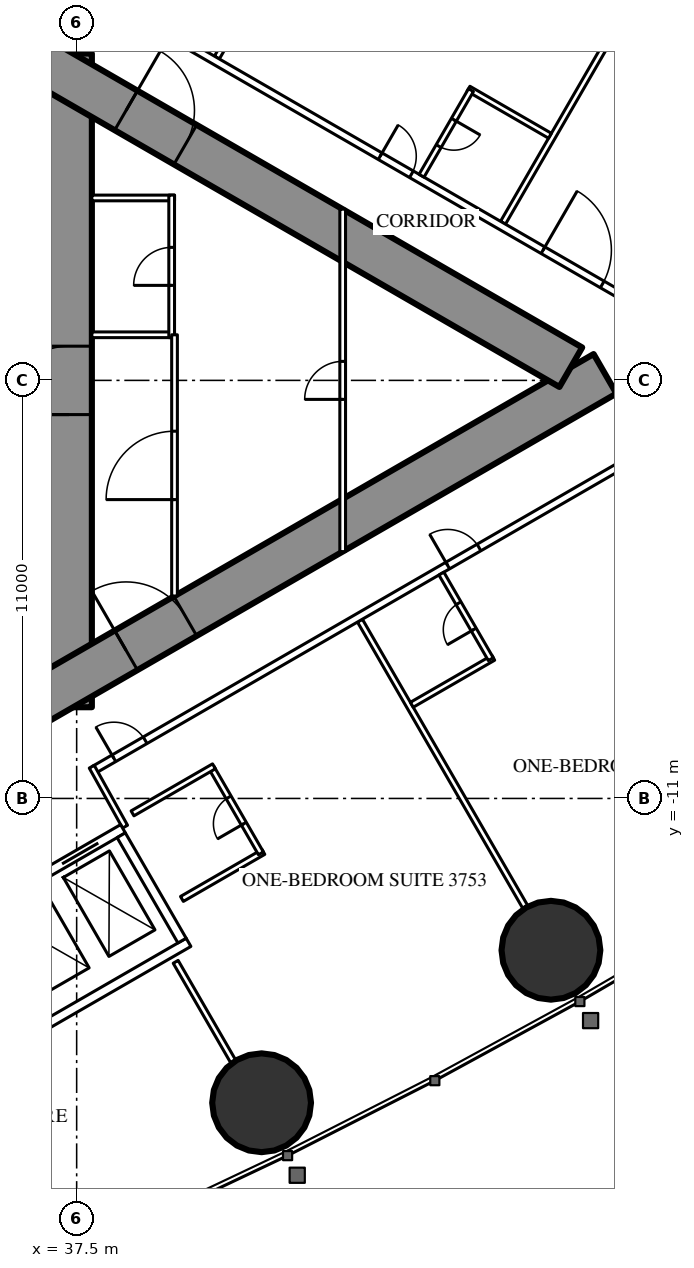
"""IFC4 building model, lengths in metres.
Left out: names, types, materials, properties, quantities, classifications, styles, units other than length and angle.
Written with IfcOpenShell. Run it as: python <this file> out.ifc"""

import sys

from ifc_helpers import new_model, si_unit, direction, frame, frame_2d, origin, origin_2d, place, context, subcontext, project, spatial, rectangle, hollow_circle, extrude, element, fill, save


model = new_model("IFC4")
c1 = context("Model", 3, precision=1e-05, world=origin(), true_north=direction((0.0, 1.0)))
c2 = subcontext(c1, "Body", "Model", "MODEL_VIEW")
j1 = project(units=[si_unit("LENGTHUNIT", "METRE"), si_unit("PLANEANGLEUNIT", "RADIAN")], contexts=[c1])
p1 = place(None, origin())
s1 = spatial("IfcSite", under=j1, at=p1, CompositionType="ELEMENT")
p2 = place(p1, origin())
s2 = spatial("IfcBuilding", under=s1, at=p2, CompositionType="ELEMENT")
p3 = place(p2, frame((0.0, 0.0, 139.6)))
s3 = spatial("IfcBuildingStorey", under=s2, at=p3, CompositionType="ELEMENT", Elevation=139.6)
for number, where, z_axis, x_axis in (
    (1, (42.366, -19.007, 0.0), (0.0, 0.0, 1.0), (1.0, 0.0, 0.0)),
    (2, (49.979, -14.994, 0.0), (0.0, 0.0, 1.0), (1.0, 0.0, 0.0)),
):
    element("IfcColumn", number, at=place(p3, frame(where, z_axis=z_axis, x_axis=x_axis)), inside=s3, PredefinedType="COLUMN", context=c2, shape_type="SweptSolid", body=[
        extrude(hollow_circle(Radius=1.3, WallThickness=0.1, at=origin_2d()), origin(), (0.0, 0.0, 1.0), 3.5),
    ])
p4 = place(p3, frame((37.3, -8.6, 0.0), z_axis=(0.0, 0.0, 1.0), x_axis=(0.0, 1.0, 0.0)))
e3 = element("IfcWall", 3, at=p4, inside=s3, PredefinedType="SHEAR", context=c2, shape_type="SweptSolid", body=[
    extrude(rectangle(XDim=17.2, YDim=1.2, at=frame_2d((8.6, 0.0))), origin(), (0.0, 0.0, 1.0), 3.5),
])
p5 = place(p4, frame((7.7, 0.0, 0.0)))
e4 = element("IfcOpeningElement", 4, at=p5, cuts=e3, PredefinedType="OPENING", context=c2, shape_type="SweptSolid", body=[
    extrude(rectangle(XDim=1.8, YDim=2.2, at=frame_2d((0.9, 1.1))), frame((0.0, 0.61, 0.0), z_axis=(0.0, -1.0, 0.0), x_axis=(1.0, 0.0, 0.0)), (0.0, 0.0, 1.0), 1.22),
])
p6 = place(p3, frame((27.2, -13.8, 0.0), z_axis=(0.0, 0.0, 1.0), x_axis=(0.866027159892, 0.499996958321, 0.0)))
e5 = element("IfcWall", 5, at=p6, inside=s3, PredefinedType="SHEAR", context=c2, shape_type="SweptSolid", body=[
    extrude(rectangle(XDim=27.947, YDim=1.2, at=frame_2d((13.973, 0.0))), origin(), (0.0, 0.0, 1.0), 3.5),
])
p7 = place(p6, frame((4.6, 0.0, 0.0)))
e6 = element("IfcOpeningElement", 6, at=p7, cuts=e5, PredefinedType="OPENING", context=c2, shape_type="SweptSolid", body=[
    extrude(rectangle(XDim=1.0, YDim=2.2, at=frame_2d((0.5, 1.1))), frame((0.0, 0.61, 0.0), z_axis=(0.0, -1.0, 0.0), x_axis=(1.0, 0.0, 0.0)), (0.0, 0.0, 1.0), 1.22),
])
p8 = place(p6, frame((13.395, 0.0, 0.0)))
e7 = element("IfcOpeningElement", 7, at=p8, cuts=e5, PredefinedType="OPENING", context=c2, shape_type="SweptSolid", body=[
    extrude(rectangle(XDim=1.8, YDim=2.2, at=frame_2d((0.9, 1.1))), frame((0.0, 0.61, 0.0), z_axis=(0.0, -1.0, 0.0), x_axis=(1.0, 0.0, 0.0)), (0.0, 0.0, 1.0), 1.22),
])
p9 = place(p3, frame((27.2, 13.8, 0.0), z_axis=(0.0, 0.0, 1.0), x_axis=(0.866024515034, -0.500001539357, 0.0)))
e8 = element("IfcWall", 8, at=p9, inside=s3, PredefinedType="SHEAR", context=c2, shape_type="SweptSolid", body=[
    extrude(rectangle(XDim=26.907, YDim=1.2, at=frame_2d((13.454, 0.0))), origin(), (0.0, 0.0, 1.0), 3.5),
])
p10 = place(p9, frame((4.6, 0.0, 0.0)))
e9 = element("IfcOpeningElement", 9, at=p10, cuts=e8, PredefinedType="OPENING", context=c2, shape_type="SweptSolid", body=[
    extrude(rectangle(XDim=1.0, YDim=2.2, at=frame_2d((0.5, 1.1))), frame((0.0, 0.61, 0.0), z_axis=(0.0, -1.0, 0.0), x_axis=(1.0, 0.0, 0.0)), (0.0, 0.0, 1.0), 1.22),
])
p11 = place(p9, frame((13.395, 0.0, 0.0)))
e10 = element("IfcOpeningElement", 10, at=p11, cuts=e8, PredefinedType="OPENING", context=c2, shape_type="SweptSolid", body=[
    extrude(rectangle(XDim=1.8, YDim=2.2, at=frame_2d((0.9, 1.1))), frame((0.0, 0.61, 0.0), z_axis=(0.0, -1.0, 0.0), x_axis=(1.0, 0.0, 0.0)), (0.0, 0.0, 1.0), 1.22),
])
p12 = place(p3, frame((44.954, -6.321, 0.0), z_axis=(0.0, 0.0, 1.0), x_axis=(0.500018676722, -0.866014620505, 0.0)))
e11 = element("IfcWall", 11, at=p12, inside=s3, PredefinedType="PARTITIONING", context=c2, shape_type="SweptSolid", body=[
    extrude(rectangle(XDim=8.704, YDim=0.15, at=frame_2d((4.352, 0.0))), origin(), (0.0, 0.0, 1.0), 2.2),
])
p13 = place(p3, frame((41.19, 8.494, 0.0), z_axis=(0.0, 0.0, 1.0), x_axis=(0.49999258054, 0.866029687369, 0.0)))
e12 = element("IfcWall", 12, at=p13, inside=s3, PredefinedType="PARTITIONING", context=c2, shape_type="SweptSolid", body=[
    extrude(rectangle(XDim=11.318, YDim=0.15, at=frame_2d((5.659, 0.0))), origin(), (0.0, 0.0, 1.0), 3.25),
])
p14 = place(p3, frame((48.719, 4.147, 0.0), z_axis=(0.0, 0.0, 1.0), x_axis=(0.499993328235, 0.866029255696, 0.0)))
e13 = element("IfcWall", 13, at=p14, inside=s3, PredefinedType="PARTITIONING", context=c2, shape_type="SweptSolid", body=[
    extrude(rectangle(XDim=8.686, YDim=0.15, at=frame_2d((4.343, 0.0))), origin(), (0.0, 0.0, 1.0), 2.2),
])
p15 = place(p3, frame((40.105, -15.299, 0.0), z_axis=(0.0, 0.0, 1.0), x_axis=(0.499978822259, -0.866037630414, 0.0)))
e14 = element("IfcWall", 14, at=p15, inside=s3, PredefinedType="PARTITIONING", context=c2, shape_type="SweptSolid", body=[
    extrude(rectangle(XDim=3.023, YDim=0.15, at=frame_2d((1.511, 0.0))), origin(), (0.0, 0.0, 1.0), 3.25),
])
p16 = place(p3, frame((37.96, -10.243, 0.0), z_axis=(0.0, 0.0, 1.0), x_axis=(0.866026429433, 0.499998223521, 0.0)))
e15 = element("IfcWall", 15, at=p16, inside=s3, PredefinedType="PARTITIONING", context=c2, shape_type="SweptSolid", body=[
    extrude(rectangle(XDim=20.487, YDim=0.2, at=frame_2d((10.243, 0.0))), origin(), (0.0, 0.0, 1.0), 3.25),
])
p17 = place(p16, frame((10.743, 0.0, 0.0)))
e16 = element("IfcOpeningElement", 16, at=p17, cuts=e15, PredefinedType="OPENING", context=c2, shape_type="SweptSolid", body=[
    extrude(rectangle(XDim=0.95, YDim=2.2, at=frame_2d((0.475, 1.1))), frame((0.0, 0.11, 0.0), z_axis=(0.0, -1.0, 0.0), x_axis=(1.0, 0.0, 0.0)), (0.0, 0.0, 1.0), 0.22),
])
p18 = place(p16, frame((17.586, 0.0, 0.0)))
e17 = element("IfcOpeningElement", 17, at=p18, cuts=e15, PredefinedType="OPENING", context=c2, shape_type="SweptSolid", body=[
    extrude(rectangle(XDim=1.8, YDim=2.2, at=frame_2d((0.9, 1.1))), frame((0.0, 0.11, 0.0), z_axis=(0.0, -1.0, 0.0), x_axis=(1.0, 0.0, 0.0)), (0.0, 0.0, 1.0), 0.22),
])
p19 = place(p16, frame((0.6, 0.0, 0.0)))
e18 = element("IfcOpeningElement", 18, at=p19, cuts=e15, PredefinedType="OPENING", context=c2, shape_type="SweptSolid", body=[
    extrude(rectangle(XDim=0.95, YDim=2.2, at=frame_2d((0.475, 1.1))), frame((0.0, 0.11, 0.0), z_axis=(0.0, -1.0, 0.0), x_axis=(1.0, 0.0, 0.0)), (0.0, 0.0, 1.0), 0.22),
])
p20 = place(p3, frame((36.834, 10.894, 0.0), z_axis=(0.0, 0.0, 1.0), x_axis=(0.866028157229, -0.499995230863, 0.0)))
e19 = element("IfcWall", 19, at=p20, inside=s3, PredefinedType="PARTITIONING", context=c2, shape_type="SweptSolid", body=[
    extrude(rectangle(XDim=21.667, YDim=0.2, at=frame_2d((10.833, 0.0))), origin(), (0.0, 0.0, 1.0), 3.25),
])
p21 = place(p20, frame((20.117, 0.0, 0.0)))
e20 = element("IfcOpeningElement", 20, at=p21, cuts=e19, PredefinedType="OPENING", context=c2, shape_type="SweptSolid", body=[
    extrude(rectangle(XDim=0.95, YDim=2.2, at=frame_2d((0.475, 1.1))), frame((0.0, 0.11, 0.0), z_axis=(0.0, -1.0, 0.0), x_axis=(1.0, 0.0, 0.0)), (0.0, 0.0, 1.0), 0.22),
])
p22 = place(p20, frame((14.938, 0.0, 0.0)))
e21 = element("IfcOpeningElement", 21, at=p22, cuts=e19, PredefinedType="OPENING", context=c2, shape_type="SweptSolid", body=[
    extrude(rectangle(XDim=1.8, YDim=2.2, at=frame_2d((0.9, 1.1))), frame((0.0, 0.11, 0.0), z_axis=(0.0, -1.0, 0.0), x_axis=(1.0, 0.0, 0.0)), (0.0, 0.0, 1.0), 0.22),
])
p23 = place(p20, frame((9.99, 0.0, 0.0)))
e22 = element("IfcOpeningElement", 22, at=p23, cuts=e19, PredefinedType="OPENING", context=c2, shape_type="SweptSolid", body=[
    extrude(rectangle(XDim=0.95, YDim=2.2, at=frame_2d((0.475, 1.1))), frame((0.0, 0.11, 0.0), z_axis=(0.0, -1.0, 0.0), x_axis=(1.0, 0.0, 0.0)), (0.0, 0.0, 1.0), 0.22),
])
p24 = place(p20, frame((3.35, 0.0, 0.0)))
e23 = element("IfcOpeningElement", 23, at=p24, cuts=e19, PredefinedType="OPENING", context=c2, shape_type="SweptSolid", body=[
    extrude(rectangle(XDim=1.0, YDim=2.2, at=frame_2d((0.5, 1.1))), frame((0.0, 0.11, 0.0), z_axis=(0.0, -1.0, 0.0), x_axis=(1.0, 0.0, 0.0)), (0.0, 0.0, 1.0), 0.22),
])
p25 = place(p3, frame((38.773, -11.742, 0.0), z_axis=(0.0, 0.0, 1.0), x_axis=(-0.485528096672, 0.8742210632, 0.0)))
e24 = element("IfcWall", 24, at=p25, inside=s3, PredefinedType="PARTITIONING", context=c2, shape_type="SweptSolid", body=[
    extrude(rectangle(XDim=1.805, YDim=0.15, at=frame_2d((0.903, 0.0))), origin(), (0.0, 0.0, 1.0), 3.25),
])
p26 = place(p3, frame((46.319, -8.535, 0.0), z_axis=(0.0, 0.0, 1.0), x_axis=(0.866006523861, 0.500032699561, 0.0)))
e25 = element("IfcWall", 25, at=p26, inside=s3, PredefinedType="PARTITIONING", context=c2, shape_type="SweptSolid", body=[
    extrude(rectangle(XDim=2.475, YDim=0.15, at=frame_2d((1.237, 0.0))), origin(), (0.0, 0.0, 1.0), 3.25),
])
p27 = place(p3, frame((47.097, -5.084, 0.0), z_axis=(0.0, 0.0, 1.0), x_axis=(0.500006934395, -0.866021400173, 0.0)))
e26 = element("IfcWall", 26, at=p27, inside=s3, PredefinedType="PARTITIONING", context=c2, shape_type="SweptSolid", body=[
    extrude(rectangle(XDim=2.6, YDim=0.15, at=frame_2d((1.3, 0.0))), origin(), (0.0, 0.0, 1.0), 3.25),
])
p28 = place(p27, frame((0.9, 0.0, 0.0)))
e27 = element("IfcOpeningElement", 27, at=p28, cuts=e26, PredefinedType="OPENING", context=c2, shape_type="SweptSolid", body=[
    extrude(rectangle(XDim=0.8, YDim=2.2, at=frame_2d((0.4, 1.1))), frame((0.0, 0.085, 0.0), z_axis=(0.0, -1.0, 0.0), x_axis=(1.0, 0.0, 0.0)), (0.0, 0.0, 1.0), 0.17),
])
p29 = place(p3, frame((47.81, 7.674, 0.0), z_axis=(0.0, 0.0, 1.0), x_axis=(0.866031185235, -0.4999899861, 0.0)))
e28 = element("IfcWall", 28, at=p29, inside=s3, PredefinedType="PARTITIONING", context=c2, shape_type="SweptSolid", body=[
    extrude(rectangle(XDim=2.475, YDim=0.15, at=frame_2d((1.238, 0.0))), origin(), (0.0, 0.0, 1.0), 3.25),
])
p30 = place(p3, frame((46.575, 5.385, 0.0), z_axis=(0.0, 0.0, 1.0), x_axis=(0.500006934395, 0.866021400173, 0.0)))
e29 = element("IfcWall", 29, at=p30, inside=s3, PredefinedType="PARTITIONING", context=c2, shape_type="SweptSolid", body=[
    extrude(rectangle(XDim=2.6, YDim=0.15, at=frame_2d((1.3, 0.0))), origin(), (0.0, 0.0, 1.0), 3.25),
])
p31 = place(p30, frame((0.9, 0.0, 0.0)))
e30 = element("IfcOpeningElement", 30, at=p31, cuts=e29, PredefinedType="OPENING", context=c2, shape_type="SweptSolid", body=[
    extrude(rectangle(XDim=0.8, YDim=2.2, at=frame_2d((0.4, 1.1))), frame((0.0, 0.085, 0.0), z_axis=(0.0, -1.0, 0.0), x_axis=(1.0, 0.0, 0.0)), (0.0, 0.0, 1.0), 0.17),
])
p32 = place(p3, frame((40.27, -13.644, 0.0), z_axis=(0.0, 0.0, 1.0), x_axis=(0.866031185235, 0.4999899861, 0.0)))
e31 = element("IfcWall", 31, at=p32, inside=s3, PredefinedType="PARTITIONING", context=c2, shape_type="SweptSolid", body=[
    extrude(rectangle(XDim=2.475, YDim=0.15, at=frame_2d((1.238, 0.0))), origin(), (0.0, 0.0, 1.0), 3.25),
])
p33 = place(p3, frame((41.048, -10.193, 0.0), z_axis=(0.0, 0.0, 1.0), x_axis=(0.500047596559, -0.865997922154, 0.0)))
e32 = element("IfcWall", 32, at=p33, inside=s3, PredefinedType="PARTITIONING", context=c2, shape_type="SweptSolid", body=[
    extrude(rectangle(XDim=2.6, YDim=0.15, at=frame_2d((1.3, 0.0))), origin(), (0.0, 0.0, 1.0), 3.25),
])
p34 = place(p33, frame((0.9, 0.0, 0.0)))
e33 = element("IfcOpeningElement", 33, at=p34, cuts=e32, PredefinedType="OPENING", context=c2, shape_type="SweptSolid", body=[
    extrude(rectangle(XDim=0.8, YDim=2.2, at=frame_2d((0.4, 1.1))), frame((0.0, 0.085, 0.0), z_axis=(0.0, -1.0, 0.0), x_axis=(1.0, 0.0, 0.0)), (0.0, 0.0, 1.0), 0.17),
])
p35 = place(p3, frame((38.97, -11.393, 0.0), z_axis=(0.0, 0.0, 1.0), x_axis=(0.866031185235, 0.4999899861, 0.0)))
e34 = element("IfcWall", 34, at=p35, inside=s3, PredefinedType="PARTITIONING", context=c2, shape_type="SweptSolid", body=[
    extrude(rectangle(XDim=2.475, YDim=0.15, at=frame_2d((1.238, 0.0))), origin(), (0.0, 0.0, 1.0), 3.25),
])
for number, where, z_axis, x_axis in (
    (35, (37.9, 1.2, 0.0), (0.0, 0.0, 1.0), (1.0, 0.0, 0.0)),
    (36, (37.9, 4.8, 0.0), (0.0, 0.0, 1.0), (1.0, 0.0, 0.0)),
):
    element("IfcWall", number, at=place(p3, frame(where, z_axis=z_axis, x_axis=x_axis)), inside=s3, PredefinedType="PARTITIONING", context=c2, shape_type="SweptSolid", body=[
        extrude(rectangle(XDim=2.175, YDim=0.15, at=frame_2d((1.087, 0.0))), origin(), (0.0, 0.0, 1.0), 3.25),
    ])
p36 = place(p3, frame((40.0, 1.125, 0.0), z_axis=(0.0, 0.0, 1.0), x_axis=(0.0, 1.0, 0.0)))
e37 = element("IfcWall", 37, at=p36, inside=s3, PredefinedType="PARTITIONING", context=c2, shape_type="SweptSolid", body=[
    extrude(rectangle(XDim=3.75, YDim=0.15, at=frame_2d((1.875, 0.0))), origin(), (0.0, 0.0, 1.0), 3.25),
])
p37 = place(p36, frame((1.375, 0.0, 0.0)))
e38 = element("IfcOpeningElement", 38, at=p37, cuts=e37, PredefinedType="OPENING", context=c2, shape_type="SweptSolid", body=[
    extrude(rectangle(XDim=1.0, YDim=2.2, at=frame_2d((0.5, 1.1))), frame((0.0, 0.085, 0.0), z_axis=(0.0, -1.0, 0.0), x_axis=(1.0, 0.0, 0.0)), (0.0, 0.0, 1.0), 0.17),
])
p38 = place(p3, frame((40.075, -5.674, 0.0), z_axis=(0.0, 0.0, 1.0), x_axis=(0.0, 1.0, 0.0)))
e39 = element("IfcWall", 39, at=p38, inside=s3, PredefinedType="PARTITIONING", context=c2, shape_type="SweptSolid", body=[
    extrude(rectangle(XDim=6.874, YDim=0.15, at=frame_2d((3.437, 0.0))), origin(), (0.0, 0.0, 1.0), 3.25),
])
p39 = place(p38, frame((2.537, 0.0, 0.0)))
e40 = element("IfcOpeningElement", 40, at=p39, cuts=e39, PredefinedType="OPENING", context=c2, shape_type="SweptSolid", body=[
    extrude(rectangle(XDim=1.8, YDim=2.2, at=frame_2d((0.9, 1.1))), frame((0.0, 0.085, 0.0), z_axis=(0.0, -1.0, 0.0), x_axis=(1.0, 0.0, 0.0)), (0.0, 0.0, 1.0), 0.17),
])
p40 = place(p3, frame((44.5, -4.505, 0.0), z_axis=(0.0, 0.0, 1.0), x_axis=(0.0, 1.0, 0.0)))
e41 = element("IfcWall", 41, at=p40, inside=s3, PredefinedType="PARTITIONING", context=c2, shape_type="SweptSolid", body=[
    extrude(rectangle(XDim=9.009, YDim=0.15, at=frame_2d((4.505, 0.0))), origin(), (0.0, 0.0, 1.0), 2.45),
])
p41 = place(p40, frame((4.005, 0.0, 0.0)))
e42 = element("IfcOpeningElement", 42, at=p41, cuts=e41, PredefinedType="OPENING", context=c2, shape_type="SweptSolid", body=[
    extrude(rectangle(XDim=1.0, YDim=2.2, at=frame_2d((0.5, 1.1))), frame((0.0, 0.085, 0.0), z_axis=(0.0, -1.0, 0.0), x_axis=(1.0, 0.0, 0.0)), (0.0, 0.0, 1.0), 0.17),
])
p42 = place(p3, frame((31.271, -16.097, 0.0), z_axis=(0.0, 0.0, 1.0), x_axis=(0.86604045752, 0.499973925258, 0.0)))
e43 = element("IfcWall", 43, at=p42, inside=s3, PredefinedType="PARTITIONING", context=c2, shape_type="SweptSolid", body=[
    extrude(rectangle(XDim=8.6, YDim=0.25, at=frame_2d((4.3, 0.0))), origin(), (0.0, 0.0, 1.0), 3.25),
])
p43 = place(p42, frame((0.75, 0.0, 0.0)))
e44 = element("IfcOpeningElement", 44, at=p43, cuts=e43, PredefinedType="OPENING", context=c2, shape_type="SweptSolid", body=[
    extrude(rectangle(XDim=1.1, YDim=2.2, at=frame_2d((0.55, 1.1))), frame((0.0, 0.135, 0.0), z_axis=(0.0, -1.0, 0.0), x_axis=(1.0, 0.0, 0.0)), (0.0, 0.0, 1.0), 0.27),
])
p44 = place(p42, frame((2.75, 0.0, 0.0)))
e45 = element("IfcOpeningElement", 45, at=p44, cuts=e43, PredefinedType="OPENING", context=c2, shape_type="SweptSolid", body=[
    extrude(rectangle(XDim=1.1, YDim=2.2, at=frame_2d((0.55, 1.1))), frame((0.0, 0.135, 0.0), z_axis=(0.0, -1.0, 0.0), x_axis=(1.0, 0.0, 0.0)), (0.0, 0.0, 1.0), 0.27),
])
p45 = place(p42, frame((4.75, 0.0, 0.0)))
e46 = element("IfcOpeningElement", 46, at=p45, cuts=e43, PredefinedType="OPENING", context=c2, shape_type="SweptSolid", body=[
    extrude(rectangle(XDim=1.1, YDim=2.2, at=frame_2d((0.55, 1.1))), frame((0.0, 0.135, 0.0), z_axis=(0.0, -1.0, 0.0), x_axis=(1.0, 0.0, 0.0)), (0.0, 0.0, 1.0), 0.27),
])
p46 = place(p42, frame((6.75, 0.0, 0.0)))
e47 = element("IfcOpeningElement", 47, at=p46, cuts=e43, PredefinedType="OPENING", context=c2, shape_type="SweptSolid", body=[
    extrude(rectangle(XDim=1.1, YDim=2.2, at=frame_2d((0.55, 1.1))), frame((0.0, 0.135, 0.0), z_axis=(0.0, -1.0, 0.0), x_axis=(1.0, 0.0, 0.0)), (0.0, 0.0, 1.0), 0.27),
])
p47 = place(p3, frame((32.996, -19.086, 0.0), z_axis=(0.0, 0.0, 1.0), x_axis=(0.866028165386, 0.499995216735, 0.0)))
e48 = element("IfcWall", 48, at=p47, inside=s3, PredefinedType="PARTITIONING", context=c2, shape_type="SweptSolid", body=[
    extrude(rectangle(XDim=8.6, YDim=0.25, at=frame_2d((4.3, 0.0))), origin(), (0.0, 0.0, 1.0), 3.25),
])
p48 = place(p3, frame((38.673, -11.968, 0.0), z_axis=(0.0, 0.0, 1.0), x_axis=(0.499929347863, -0.866066190972, 0.0)))
e49 = element("IfcWall", 49, at=p48, inside=s3, PredefinedType="PARTITIONING", context=c2, shape_type="SweptSolid", body=[
    extrude(rectangle(XDim=3.201, YDim=0.25, at=frame_2d((1.6, 0.0))), origin(), (0.0, 0.0, 1.0), 3.25),
])
p49 = place(p28, origin())
e50 = element("IfcDoor", 50, at=p49, inside=s3, OperationType="SINGLE_SWING_RIGHT", PredefinedType="DOOR", context=c2, shape_type="SweptSolid", body=[
    extrude(rectangle(XDim=0.8, YDim=2.2, at=frame_2d((0.4, 1.1))), frame((0.0, 0.025, 0.0), z_axis=(0.0, -1.0, 0.0), x_axis=(1.0, 0.0, 0.0)), (0.0, 0.0, 1.0), 0.05),
])
fill(e27, e50)
p50 = place(p17, origin())
e51 = element("IfcDoor", 51, at=p50, inside=s3, OperationType="SINGLE_SWING_LEFT", PredefinedType="DOOR", context=c2, shape_type="SweptSolid", body=[
    extrude(rectangle(XDim=0.95, YDim=2.2, at=frame_2d((0.475, 1.1))), frame((0.0, 0.025, 0.0), z_axis=(0.0, -1.0, 0.0), x_axis=(1.0, 0.0, 0.0)), (0.0, 0.0, 1.0), 0.05),
])
fill(e16, e51)
p51 = place(p22, origin())
e52 = element("IfcDoor", 52, at=p51, inside=s3, OperationType="DOUBLE_DOOR_SINGLE_SWING", PredefinedType="DOOR", context=c2, shape_type="SweptSolid", body=[
    extrude(rectangle(XDim=1.8, YDim=2.2, at=frame_2d((0.9, 1.1))), frame((0.0, 0.025, 0.0), z_axis=(0.0, -1.0, 0.0), x_axis=(1.0, 0.0, 0.0)), (0.0, 0.0, 1.0), 0.05),
])
fill(e21, e52)
p52 = place(p31, origin())
e53 = element("IfcDoor", 53, at=p52, inside=s3, OperationType="SINGLE_SWING_RIGHT", PredefinedType="DOOR", context=c2, shape_type="SweptSolid", body=[
    extrude(rectangle(XDim=0.8, YDim=2.2, at=frame_2d((0.4, 1.1))), frame((0.0, 0.025, 0.0), z_axis=(0.0, -1.0, 0.0), x_axis=(1.0, 0.0, 0.0)), (0.0, 0.0, 1.0), 0.05),
])
fill(e30, e53)
p53 = place(p23, origin())
e54 = element("IfcDoor", 54, at=p53, inside=s3, OperationType="SINGLE_SWING_LEFT", PredefinedType="DOOR", context=c2, shape_type="SweptSolid", body=[
    extrude(rectangle(XDim=0.95, YDim=2.2, at=frame_2d((0.475, 1.1))), frame((0.0, 0.025, 0.0), z_axis=(0.0, -1.0, 0.0), x_axis=(1.0, 0.0, 0.0)), (0.0, 0.0, 1.0), 0.05),
])
fill(e22, e54)
p54 = place(p34, origin())
e55 = element("IfcDoor", 55, at=p54, inside=s3, OperationType="SINGLE_SWING_RIGHT", PredefinedType="DOOR", context=c2, shape_type="SweptSolid", body=[
    extrude(rectangle(XDim=0.8, YDim=2.2, at=frame_2d((0.4, 1.1))), frame((0.0, 0.025, 0.0), z_axis=(0.0, -1.0, 0.0), x_axis=(1.0, 0.0, 0.0)), (0.0, 0.0, 1.0), 0.05),
])
fill(e33, e55)
p55 = place(p19, origin())
e56 = element("IfcDoor", 56, at=p55, inside=s3, OperationType="SINGLE_SWING_LEFT", PredefinedType="DOOR", context=c2, shape_type="SweptSolid", body=[
    extrude(rectangle(XDim=0.95, YDim=2.2, at=frame_2d((0.475, 1.1))), frame((0.0, 0.025, 0.0), z_axis=(0.0, -1.0, 0.0), x_axis=(1.0, 0.0, 0.0)), (0.0, 0.0, 1.0), 0.05),
])
fill(e18, e56)
p56 = place(p37, origin())
e57 = element("IfcDoor", 57, at=p56, inside=s3, OperationType="SINGLE_SWING_LEFT", PredefinedType="DOOR", context=c2, shape_type="SweptSolid", body=[
    extrude(rectangle(XDim=1.0, YDim=2.2, at=frame_2d((0.5, 1.1))), frame((0.0, 0.025, 0.0), z_axis=(0.0, -1.0, 0.0), x_axis=(1.0, 0.0, 0.0)), (0.0, 0.0, 1.0), 0.05),
])
fill(e38, e57)
p57 = place(p39, origin())
e58 = element("IfcDoor", 58, at=p57, inside=s3, OperationType="DOUBLE_DOOR_SINGLE_SWING", PredefinedType="DOOR", context=c2, shape_type="SweptSolid", body=[
    extrude(rectangle(XDim=1.8, YDim=2.2, at=frame_2d((0.9, 1.1))), frame((0.0, 0.025, 0.0), z_axis=(0.0, -1.0, 0.0), x_axis=(1.0, 0.0, 0.0)), (0.0, 0.0, 1.0), 0.05),
])
fill(e40, e58)
p58 = place(p41, origin())
e59 = element("IfcDoor", 59, at=p58, inside=s3, OperationType="SINGLE_SWING_LEFT", PredefinedType="DOOR", context=c2, shape_type="SweptSolid", body=[
    extrude(rectangle(XDim=1.0, YDim=2.2, at=frame_2d((0.5, 1.1))), frame((0.0, 0.025, 0.0), z_axis=(0.0, -1.0, 0.0), x_axis=(1.0, 0.0, 0.0)), (0.0, 0.0, 1.0), 0.05),
])
fill(e42, e59)
p59 = place(p8, origin())
e60 = element("IfcDoor", 60, at=p59, inside=s3, OperationType="DOUBLE_DOOR_SINGLE_SWING", PredefinedType="DOOR", context=c2, shape_type="SweptSolid", body=[
    extrude(rectangle(XDim=1.8, YDim=2.2, at=frame_2d((0.9, 1.1))), frame((0.0, 0.025, 0.0), z_axis=(0.0, -1.0, 0.0), x_axis=(1.0, 0.0, 0.0)), (0.0, 0.0, 1.0), 0.05),
])
fill(e7, e60)
p60 = place(p11, origin())
e61 = element("IfcDoor", 61, at=p60, inside=s3, OperationType="DOUBLE_DOOR_SINGLE_SWING", PredefinedType="DOOR", context=c2, shape_type="SweptSolid", body=[
    extrude(rectangle(XDim=1.8, YDim=2.2, at=frame_2d((0.9, 1.1))), frame((0.0, 0.025, 0.0), z_axis=(0.0, -1.0, 0.0), x_axis=(1.0, 0.0, 0.0)), (0.0, 0.0, 1.0), 0.05),
])
fill(e10, e61)
p61 = place(p5, origin())
e62 = element("IfcDoor", 62, at=p61, inside=s3, OperationType="DOUBLE_DOOR_SINGLE_SWING", PredefinedType="DOOR", context=c2, shape_type="SweptSolid", body=[
    extrude(rectangle(XDim=1.8, YDim=2.2, at=frame_2d((0.9, 1.1))), frame((0.0, 0.025, 0.0), z_axis=(0.0, -1.0, 0.0), x_axis=(1.0, 0.0, 0.0)), (0.0, 0.0, 1.0), 0.05),
])
fill(e4, e62)
p62 = place(p46, origin())
e63 = element("IfcDoor", 63, at=p62, inside=s3, OperationType="DOUBLE_DOOR_SLIDING", PredefinedType="USERDEFINED", context=c2, shape_type="SweptSolid", body=[
    extrude(rectangle(XDim=1.1, YDim=2.2, at=frame_2d((0.55, 1.1))), frame((0.0, 0.025, 0.0), z_axis=(0.0, -1.0, 0.0), x_axis=(1.0, 0.0, 0.0)), (0.0, 0.0, 1.0), 0.05),
])
fill(e47, e63)
save(model, sys.argv[1])
